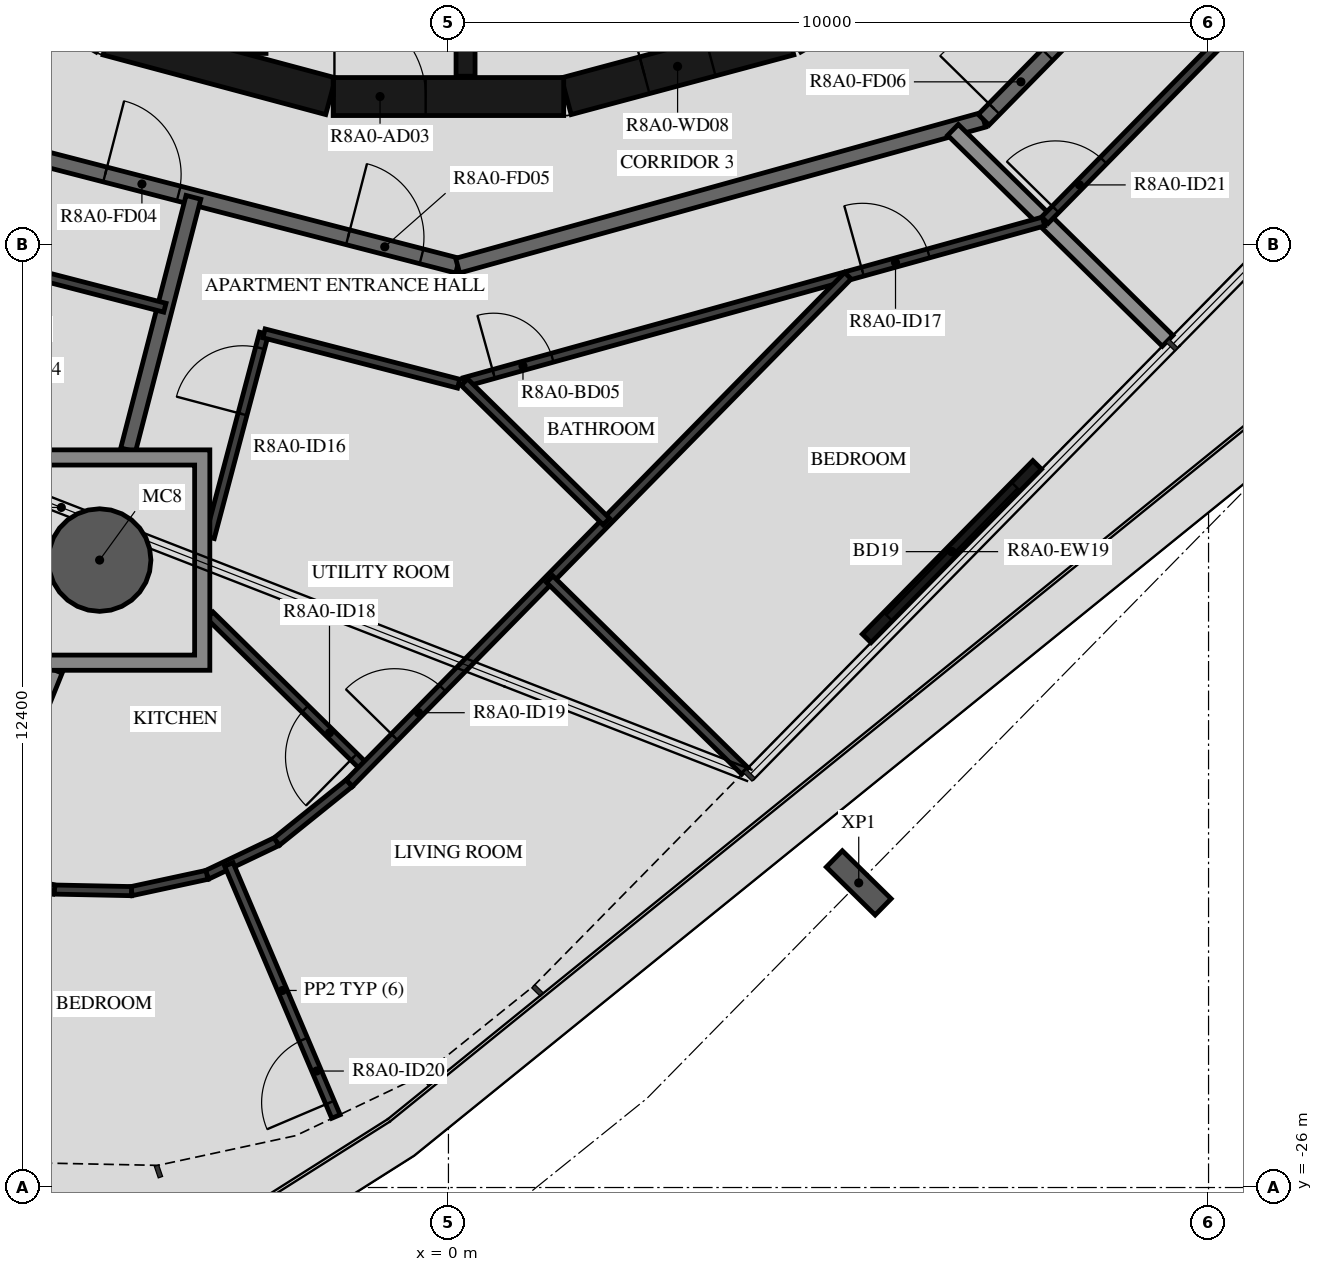
"""IFC4 building model, lengths in metres.
Left out: names, types, materials, properties, quantities, classifications, styles, units other than length and angle.
Written with IfcOpenShell. Run it as: python <this file> out.ifc"""

import sys

from ifc_helpers import new_model, si_unit, direction, frame, frame_2d, origin, origin_2d, place, context, subcontext, project, spatial, polyline, rectangle, hollow_circle, i_section, outline, extrude, element, fill, save


model = new_model("IFC4")
c1 = context("Model", 3, precision=1e-05, world=origin(), true_north=direction((0.0, 1.0)))
c2 = subcontext(c1, "Body", "Model", "MODEL_VIEW")
j1 = project(units=[si_unit("LENGTHUNIT", "METRE"), si_unit("PLANEANGLEUNIT", "RADIAN")], contexts=[c1])
p1 = place(None, origin())
s1 = spatial("IfcSite", under=j1, at=p1, CompositionType="ELEMENT")
p2 = place(p1, origin())
s2 = spatial("IfcBuilding", under=s1, at=p2, CompositionType="ELEMENT")
p3 = place(p2, frame((0.0, 0.0, 298.2)))
s3 = spatial("IfcBuildingStorey", under=s2, at=p3, CompositionType="ELEMENT", Elevation=298.2)
p4 = place(p3, frame((-4.589, -17.745, -0.45), z_axis=(0.0, 0.0, 1.0), x_axis=(1.0, 0.0, 0.0)))
e1 = element("IfcColumn", 1, at=p4, inside=s3, PredefinedType="COLUMN", context=c2, shape_type="SweptSolid", body=[
    extrude(hollow_circle(Radius=0.675, WallThickness=0.03, at=origin_2d()), origin(), (0.0, 0.0, 1.0), 3.57),
])
p5 = place(p3, frame((5.398, -21.992, -0.45), z_axis=(0.0, 0.0, 1.0), x_axis=(-0.70090935439, -0.713250360623, 0.0)))
e2 = element("IfcColumn", 2, at=p5, inside=s3, PredefinedType="COLUMN", context=c2, shape_type="SweptSolid", body=[
    extrude(i_section(OverallWidth=0.3, OverallDepth=0.9, WebThickness=0.019, FlangeThickness=0.035, FilletRadius=0.03, at=origin_2d()), origin(), (0.0, 0.0, 1.0), 3.57),
])
p6 = place(p3, frame((5.502, -18.776, 0.0), z_axis=(0.0, 0.0, 1.0), x_axis=(0.700900076932, 0.713259477439, 0.0)))
e3 = element("IfcWall", 3, at=p6, inside=s3, PredefinedType="STANDARD", context=c2, shape_type="SweptSolid", body=[
    extrude(rectangle(XDim=3.2, YDim=0.16, at=frame_2d((1.6, 0.0))), origin(), (0.0, 0.0, 1.0), 3.12),
])
p7 = place(p6, frame((0.4, 0.0, 0.0)))
e4 = element("IfcOpeningElement", 4, at=p7, cuts=e3, PredefinedType="OPENING", context=c2, shape_type="SweptSolid", body=[
    extrude(rectangle(XDim=2.4, YDim=2.4, at=frame_2d((1.2, 1.2))), frame((0.0, 0.09, 0.0), z_axis=(0.0, -1.0, 0.0), x_axis=(1.0, 0.0, 0.0)), (0.0, 0.0, 1.0), 0.18),
])
p8 = place(p3, frame((1.55, -11.643, 0.0), z_axis=(0.0, 0.0, 1.0), x_axis=(0.965948410781, 0.258734743916, 0.0)))
e5 = element("IfcWall", 5, at=p8, inside=s3, PredefinedType="SHEAR", context=c2, shape_type="SweptSolid", body=[
    extrude(rectangle(XDim=3.033, YDim=0.5, at=frame_2d((1.516, 0.0))), origin(), (0.0, 0.0, 1.0), 3.12),
])
p9 = place(p8, frame((1.066, 0.0, 0.0)))
e6 = element("IfcOpeningElement", 6, at=p9, cuts=e5, PredefinedType="OPENING", context=c2, shape_type="SweptSolid", body=[
    extrude(rectangle(XDim=0.9, YDim=2.1, at=frame_2d((0.45, 1.05))), frame((0.0, 0.26, 0.0), z_axis=(0.0, -1.0, 0.0), x_axis=(1.0, 0.0, 0.0)), (0.0, 0.0, 1.0), 0.52),
])
p10 = place(p3, frame((-4.479, -10.858, 0.0), z_axis=(0.0, 0.0, 1.0), x_axis=(0.965948410781, -0.258734743916, 0.0)))
e7 = element("IfcWall", 7, at=p10, inside=s3, PredefinedType="SHEAR", context=c2, shape_type="SweptSolid", body=[
    extrude(rectangle(XDim=3.033, YDim=0.5, at=frame_2d((1.516, 0.0))), origin(), (0.0, 0.0, 1.0), 3.12),
])
p11 = place(p3, frame((-1.516, -11.647, 0.0), z_axis=(0.0, 0.0, 1.0), x_axis=(1.0, 0.0, 0.0)))
e8 = element("IfcWall", 8, at=p11, inside=s3, PredefinedType="SHEAR", context=c2, shape_type="SweptSolid", body=[
    extrude(rectangle(XDim=3.033, YDim=0.5, at=frame_2d((1.516, 0.0))), origin(), (0.0, 0.0, 1.0), 3.12),
])
p12 = place(p11, frame((0.016, 0.0, 0.0)))
e9 = element("IfcOpeningElement", 9, at=p12, cuts=e8, PredefinedType="OPENING", context=c2, shape_type="SweptSolid", body=[
    extrude(rectangle(XDim=1.2, YDim=2.1, at=frame_2d((0.6, 1.05))), frame((0.0, 0.26, 0.0), z_axis=(0.0, -1.0, 0.0), x_axis=(1.0, 0.0, 0.0)), (0.0, 0.0, 1.0), 0.52),
])
p13 = place(p3, frame((-2.525, -8.97, 0.0), z_axis=(0.0, 0.0, 1.0), x_axis=(0.0, -1.0, 0.0)))
e10 = element("IfcWall", 10, at=p13, inside=s3, PredefinedType="SHEAR", context=c2, shape_type="SweptSolid", body=[
    extrude(rectangle(XDim=2.11, YDim=0.25, at=frame_2d((1.055, 0.0))), origin(), (0.0, 0.0, 1.0), 3.12),
])
p14 = place(p3, frame((0.225, -8.97, 0.0), z_axis=(0.0, 0.0, 1.0), x_axis=(0.0, -1.0, 0.0)))
e11 = element("IfcWall", 11, at=p14, inside=s3, PredefinedType="SHEAR", context=c2, shape_type="SweptSolid", body=[
    extrude(rectangle(XDim=2.41, YDim=0.25, at=frame_2d((1.205, 0.0))), origin(), (0.0, 0.0, 1.0), 3.12),
])
p15 = place(p3, frame((-6.831, -12.074, 0.0), z_axis=(0.0, 0.0, 1.0), x_axis=(0.968144780225, -0.250391063186, 0.0)))
e12 = element("IfcWall", 12, at=p15, inside=s3, PredefinedType="STANDARD", context=c2, shape_type="SweptSolid", body=[
    extrude(rectangle(XDim=7.181, YDim=0.2, at=frame_2d((3.591, 0.0))), origin(), (0.0, 0.0, 1.0), 3.12),
])
p16 = place(p15, frame((2.39, 0.0, 0.0)))
e13 = element("IfcOpeningElement", 13, at=p16, cuts=e12, PredefinedType="OPENING", context=c2, shape_type="SweptSolid", body=[
    extrude(rectangle(XDim=1.0, YDim=2.1, at=frame_2d((0.5, 1.05))), frame((0.0, 0.11, 0.0), z_axis=(0.0, -1.0, 0.0), x_axis=(1.0, 0.0, 0.0)), (0.0, 0.0, 1.0), 0.22),
])
p17 = place(p15, frame((5.69, 0.0, 0.0)))
e14 = element("IfcOpeningElement", 14, at=p17, cuts=e12, PredefinedType="OPENING", context=c2, shape_type="SweptSolid", body=[
    extrude(rectangle(XDim=1.0, YDim=2.1, at=frame_2d((0.5, 1.05))), frame((0.0, 0.11, 0.0), z_axis=(0.0, -1.0, 0.0), x_axis=(1.0, 0.0, 0.0)), (0.0, 0.0, 1.0), 0.22),
])
p18 = place(p3, frame((0.121, -13.872, 0.0), z_axis=(0.0, 0.0, 1.0), x_axis=(0.963625960674, 0.267254575108, 0.0)))
e15 = element("IfcWall", 15, at=p18, inside=s3, PredefinedType="STANDARD", context=c2, shape_type="SweptSolid", body=[
    extrude(rectangle(XDim=7.181, YDim=0.2, at=frame_2d((3.591, 0.0))), origin(), (0.0, 0.0, 1.0), 3.12),
])
p19 = place(p3, frame((7.041, -11.953, 0.0), z_axis=(0.0, 0.0, 1.0), x_axis=(0.70090916255, 0.713250549143, 0.0)))
e16 = element("IfcWall", 16, at=p19, inside=s3, PredefinedType="STANDARD", context=c2, shape_type="SweptSolid", body=[
    extrude(rectangle(XDim=7.181, YDim=0.2, at=frame_2d((3.59, 0.0))), origin(), (0.0, 0.0, 1.0), 3.12),
])
p20 = place(p19, frame((0.2, 0.0, 0.0)))
e17 = element("IfcOpeningElement", 17, at=p20, cuts=e16, PredefinedType="OPENING", context=c2, shape_type="SweptSolid", body=[
    extrude(rectangle(XDim=1.0, YDim=2.1, at=frame_2d((0.5, 1.05))), frame((0.0, 0.11, 0.0), z_axis=(0.0, -1.0, 0.0), x_axis=(1.0, 0.0, 0.0)), (0.0, 0.0, 1.0), 0.22),
])
p21 = place(p3, frame((-4.214, -16.295, 0.0), z_axis=(0.0, 0.0, 1.0), x_axis=(0.250428810918, 0.968135016752, 0.0)))
e18 = element("IfcWall", 18, at=p21, inside=s3, PredefinedType="STANDARD", context=c2, shape_type="SweptSolid", body=[
    extrude(rectangle(XDim=3.432, YDim=0.2, at=frame_2d((1.716, 0.0))), origin(), (0.0, 0.0, 1.0), 3.12),
])
p22 = place(p3, frame((-7.582, -25.151, 0.0), z_axis=(0.0, 0.0, 1.0), x_axis=(0.374645287615, 0.927168220156, 0.0)))
e19 = element("IfcWall", 19, at=p22, inside=s3, PredefinedType="STANDARD", context=c2, shape_type="SweptSolid", body=[
    extrude(rectangle(XDim=6.423, YDim=0.2, at=frame_2d((3.212, 0.0))), origin(), (0.0, 0.0, 1.0), 2.73),
])
p23 = place(p3, frame((9.462, -14.861, 0.0), z_axis=(0.0, 0.0, 1.0), x_axis=(-0.713276937124, 0.700882308927, 0.0)))
e20 = element("IfcWall", 20, at=p23, inside=s3, PredefinedType="STANDARD", context=c2, shape_type="SweptSolid", body=[
    extrude(rectangle(XDim=3.959, YDim=0.2, at=frame_2d((1.979, 0.0))), origin(), (0.0, 0.0, 1.0), 2.73),
])
p24 = place(p3, frame((-7.596, -13.426, 0.0), z_axis=(0.0, 0.0, 1.0), x_axis=(0.96815406745, -0.250355151095, 0.0)))
e21 = element("IfcWall", 21, at=p24, inside=s3, PredefinedType="PARTITIONING", context=c2, shape_type="SweptSolid", body=[
    extrude(rectangle(XDim=3.992, YDim=0.12, at=frame_2d((1.996, 0.0))), origin(), (0.0, 0.0, 1.0), 3.12),
])
p25 = place(p24, frame((0.2, 0.0, 0.0)))
e22 = element("IfcOpeningElement", 22, at=p25, cuts=e21, PredefinedType="OPENING", context=c2, shape_type="SweptSolid", body=[
    extrude(rectangle(XDim=0.9, YDim=2.1, at=frame_2d((0.45, 1.05))), frame((0.0, 0.07, 0.0), z_axis=(0.0, -1.0, 0.0), x_axis=(1.0, 0.0, 0.0)), (0.0, 0.0, 1.0), 0.14),
])
p26 = place(p3, frame((-3.139, -17.448, 0.0), z_axis=(0.0, 0.0, 1.0), x_axis=(0.256551998295, 0.966530430028, 0.0)))
e23 = element("IfcWall", 23, at=p26, inside=s3, PredefinedType="PARTITIONING", context=c2, shape_type="SweptSolid", body=[
    extrude(rectangle(XDim=2.778, YDim=0.12, at=frame_2d((1.389, 0.0))), origin(), (0.0, 0.0, 1.0), 3.12),
])
p27 = place(p26, frame((1.678, 0.0, 0.0)))
e24 = element("IfcOpeningElement", 24, at=p27, cuts=e23, PredefinedType="OPENING", context=c2, shape_type="SweptSolid", body=[
    extrude(rectangle(XDim=0.9, YDim=2.1, at=frame_2d((0.45, 1.05))), frame((0.0, 0.07, 0.0), z_axis=(0.0, -1.0, 0.0), x_axis=(1.0, 0.0, 0.0)), (0.0, 0.0, 1.0), 0.14),
])
p28 = place(p3, frame((-2.427, -14.763, 0.0), z_axis=(0.0, 0.0, 1.0), x_axis=(0.968151154118, -0.250366417036, 0.0)))
e25 = element("IfcWall", 25, at=p28, inside=s3, PredefinedType="PARTITIONING", context=c2, shape_type="SweptSolid", body=[
    extrude(rectangle(XDim=2.646, YDim=0.12, at=frame_2d((1.323, 0.0))), origin(), (0.0, 0.0, 1.0), 3.12),
])
p29 = place(p3, frame((0.21, -15.404, 0.0), z_axis=(0.0, 0.0, 1.0), x_axis=(0.963630625717, 0.267237754032, 0.0)))
e26 = element("IfcWall", 26, at=p29, inside=s3, PredefinedType="PARTITIONING", context=c2, shape_type="SweptSolid", body=[
    extrude(rectangle(XDim=7.907, YDim=0.12, at=frame_2d((3.954, 0.0))), origin(), (0.0, 0.0, 1.0), 3.12),
])
p30 = place(p29, frame((0.4, 0.0, 0.0)))
e27 = element("IfcOpeningElement", 27, at=p30, cuts=e26, PredefinedType="OPENING", context=c2, shape_type="SweptSolid", body=[
    extrude(rectangle(XDim=0.8, YDim=2.1, at=frame_2d((0.4, 1.05))), frame((0.0, 0.07, 0.0), z_axis=(0.0, -1.0, 0.0), x_axis=(1.0, 0.0, 0.0)), (0.0, 0.0, 1.0), 0.14),
])
p31 = place(p29, frame((5.436, 0.0, 0.0)))
e28 = element("IfcOpeningElement", 28, at=p31, cuts=e26, PredefinedType="OPENING", context=c2, shape_type="SweptSolid", body=[
    extrude(rectangle(XDim=0.9, YDim=2.1, at=frame_2d((0.45, 1.05))), frame((0.0, 0.07, 0.0), z_axis=(0.0, -1.0, 0.0), x_axis=(1.0, 0.0, 0.0)), (0.0, 0.0, 1.0), 0.14),
])
p32 = place(p3, frame((-2.26, -21.449, 0.0), z_axis=(0.0, 0.0, 1.0), x_axis=(-0.90254047062, -0.430605038166, 0.0)))
e29 = element("IfcWall", 29, at=p32, inside=s3, PredefinedType="PARTITIONING", context=c2, shape_type="SweptSolid", body=[
    extrude(rectangle(XDim=1.016, YDim=0.12, at=frame_2d((0.508, 0.0))), origin(), (0.0, 0.0, 1.0), 3.12),
])
for number, where, z_axis, x_axis in (
    (30, (-3.177, -21.887, 0.0), (0.0, 0.0, 1.0), (-0.978, -0.211, 0.0)),
    (31, (-4.17, -22.101, 0.0), (0.0, 0.0, 1.0), (-1.0, 0.02, 0.0)),
):
    element("IfcWall", number, at=place(p3, frame(where, z_axis=z_axis, x_axis=x_axis)), inside=s3, PredefinedType="PARTITIONING", context=c2, shape_type="SweptSolid", body=[
        extrude(rectangle(XDim=1.016, YDim=0.12, at=frame_2d((0.508, 0.0))), origin(), (0.0, 0.0, 1.0), 3.12),
    ])
p33 = place(p3, frame((-5.186, -22.08, 0.0), z_axis=(0.0, 0.0, 1.0), x_axis=(-0.968145907309, 0.250386705241, 0.0)))
e32 = element("IfcWall", 32, at=p33, inside=s3, PredefinedType="PARTITIONING", context=c2, shape_type="SweptSolid", body=[
    extrude(rectangle(XDim=1.016, YDim=0.12, at=frame_2d((0.508, 0.0))), origin(), (0.0, 0.0, 1.0), 3.12),
])
p34 = place(p3, frame((-1.48, -25.066, 0.0), z_axis=(0.0, 0.0, 1.0), x_axis=(-0.3909326022, 0.920419306912, 0.0)))
e33 = element("IfcWall", 33, at=p34, inside=s3, PredefinedType="PARTITIONING", context=c2, shape_type="SweptSolid", body=[
    extrude(rectangle(XDim=3.604, YDim=0.12, at=frame_2d((1.802, 0.0))), origin(), (0.0, 0.0, 1.0), 2.73),
])
p35 = place(p34, frame((0.2, 0.0, 0.0)))
e34 = element("IfcOpeningElement", 34, at=p35, cuts=e33, PredefinedType="OPENING", context=c2, shape_type="SweptSolid", body=[
    extrude(rectangle(XDim=0.9, YDim=2.1, at=frame_2d((0.45, 1.05))), frame((0.0, 0.07, 0.0), z_axis=(0.0, -1.0, 0.0), x_axis=(1.0, 0.0, 0.0)), (0.0, 0.0, 1.0), 0.14),
])
p36 = place(p3, frame((-1.101, -20.474, 0.0), z_axis=(0.0, 0.0, 1.0), x_axis=(-0.713316946232, 0.700841589961, 0.0)))
e35 = element("IfcWall", 35, at=p36, inside=s3, PredefinedType="PARTITIONING", context=c2, shape_type="SweptSolid", body=[
    extrude(rectangle(XDim=2.857, YDim=0.12, at=frame_2d((1.429, 0.0))), origin(), (0.0, 0.0, 1.0), 3.12),
])
p37 = place(p36, frame((0.2, 0.0, 0.0)))
e36 = element("IfcOpeningElement", 36, at=p37, cuts=e35, PredefinedType="OPENING", context=c2, shape_type="SweptSolid", body=[
    extrude(rectangle(XDim=0.9, YDim=2.1, at=frame_2d((0.45, 1.05))), frame((0.0, 0.07, 0.0), z_axis=(0.0, -1.0, 0.0), x_axis=(1.0, 0.0, 0.0)), (0.0, 0.0, 1.0), 0.14),
])
p38 = place(p3, frame((-2.26, -21.449, 0.0), z_axis=(0.0, 0.0, 1.0), x_axis=(0.779021167429, 0.626997624156, 0.0)))
e37 = element("IfcWall", 37, at=p38, inside=s3, PredefinedType="PARTITIONING", context=c2, shape_type="SweptSolid", body=[
    extrude(rectangle(XDim=1.227, YDim=0.12, at=frame_2d((0.614, 0.0))), origin(), (0.0, 0.0, 1.0), 3.12),
])
p39 = place(p3, frame((-1.304, -20.68, 0.0), z_axis=(0.0, 0.0, 1.0), x_axis=(0.700896976526, 0.713262524108, 0.0)))
e38 = element("IfcWall", 38, at=p39, inside=s3, PredefinedType="PARTITIONING", context=c2, shape_type="SweptSolid", body=[
    extrude(rectangle(XDim=9.358, YDim=0.12, at=frame_2d((4.679, 0.0))), origin(), (0.0, 0.0, 1.0), 3.12),
])
p40 = place(p39, frame((0.849, 0.0, 0.0)))
e39 = element("IfcOpeningElement", 39, at=p40, cuts=e38, PredefinedType="OPENING", context=c2, shape_type="SweptSolid", body=[
    extrude(rectangle(XDim=0.9, YDim=2.1, at=frame_2d((0.45, 1.05))), frame((0.0, 0.07, 0.0), z_axis=(0.0, -1.0, 0.0), x_axis=(1.0, 0.0, 0.0)), (0.0, 0.0, 1.0), 0.14),
])
p41 = place(p3, frame((2.077, -17.239, 0.0), z_axis=(0.0, 0.0, 1.0), x_axis=(-0.713235001716, 0.700924983381, 0.0)))
e40 = element("IfcWall", 40, at=p41, inside=s3, PredefinedType="PARTITIONING", context=c2, shape_type="SweptSolid", body=[
    extrude(rectangle(XDim=2.618, YDim=0.12, at=frame_2d((1.309, 0.0))), origin(), (0.0, 0.0, 1.0), 3.12),
])
p42 = place(p3, frame((3.9, -20.521, 0.0), z_axis=(0.0, 0.0, 1.0), x_axis=(-0.713217465002, 0.700942827637, 0.0)))
e41 = element("IfcWall", 41, at=p42, inside=s3, PredefinedType="PARTITIONING", context=c2, shape_type="SweptSolid", body=[
    extrude(rectangle(XDim=3.6, YDim=0.12, at=frame_2d((1.8, 0.0))), origin(), (0.0, 0.0, 1.0), 2.73),
])
p43 = place(p3, frame((7.846, -13.273, 0.0), z_axis=(0.0, 0.0, 1.0), x_axis=(0.700911018066, 0.713248725728, 0.0)))
e42 = element("IfcWall", 42, at=p43, inside=s3, PredefinedType="PARTITIONING", context=c2, shape_type="SweptSolid", body=[
    extrude(rectangle(XDim=7.935, YDim=0.12, at=frame_2d((3.968, 0.0))), origin(), (0.0, 0.0, 1.0), 3.12),
])
p44 = place(p43, frame((0.2, 0.0, 0.0)))
e43 = element("IfcOpeningElement", 43, at=p44, cuts=e42, PredefinedType="OPENING", context=c2, shape_type="SweptSolid", body=[
    extrude(rectangle(XDim=0.9, YDim=2.1, at=frame_2d((0.45, 1.05))), frame((0.0, 0.07, 0.0), z_axis=(0.0, -1.0, 0.0), x_axis=(1.0, 0.0, 0.0)), (0.0, 0.0, 1.0), 0.14),
])
p45 = place(p3, origin())
e44 = element("IfcWall", 44, at=p45, inside=s3, PredefinedType="STANDARD", context=c2, shape_type="SweptSolid", body=[
    extrude(outline(polyline([(-3.139, -16.295), (-3.139, -19.195), (-6.039, -19.195), (-6.039, -16.295), (-3.139, -16.295)]), holes=[polyline([(-5.839, -18.995), (-3.339, -18.995), (-3.339, -16.495), (-5.839, -16.495), (-5.839, -18.995)])]), origin(), (0.0, 0.0, 1.0), 3.12),
])
p46 = place(p7, origin())
e45 = element("IfcDoor", 45, at=p46, inside=s3, OperationType="DOUBLE_DOOR_SLIDING", PredefinedType="DOOR", context=c2, shape_type="SweptSolid", body=[
    extrude(rectangle(XDim=2.4, YDim=2.4, at=frame_2d((1.2, 1.2))), frame((0.0, 0.025, 0.0), z_axis=(0.0, -1.0, 0.0), x_axis=(1.0, 0.0, 0.0)), (0.0, 0.0, 1.0), 0.05),
])
fill(e4, e45)
p47 = place(p12, origin())
e46 = element("IfcDoor", 46, at=p47, inside=s3, OperationType="SINGLE_SWING_RIGHT", PredefinedType="DOOR", context=c2, shape_type="SweptSolid", body=[
    extrude(rectangle(XDim=1.2, YDim=2.1, at=frame_2d((0.6, 1.05))), frame((0.0, 0.025, 0.0), z_axis=(0.0, -1.0, 0.0), x_axis=(1.0, 0.0, 0.0)), (0.0, 0.0, 1.0), 0.05),
])
fill(e9, e46)
p48 = place(p9, origin())
e47 = element("IfcDoor", 47, at=p48, inside=s3, OperationType="SINGLE_SWING_RIGHT", PredefinedType="DOOR", context=c2, shape_type="SweptSolid", body=[
    extrude(rectangle(XDim=0.9, YDim=2.1, at=frame_2d((0.45, 1.05))), frame((0.0, 0.025, 0.0), z_axis=(0.0, -1.0, 0.0), x_axis=(1.0, 0.0, 0.0)), (0.0, 0.0, 1.0), 0.05),
])
fill(e6, e47)
p49 = place(p16, origin())
e48 = element("IfcDoor", 48, at=p49, inside=s3, OperationType="SINGLE_SWING_RIGHT", PredefinedType="DOOR", context=c2, shape_type="SweptSolid", body=[
    extrude(rectangle(XDim=1.0, YDim=2.1, at=frame_2d((0.5, 1.05))), frame((0.0, 0.025, 0.0), z_axis=(0.0, -1.0, 0.0), x_axis=(1.0, 0.0, 0.0)), (0.0, 0.0, 1.0), 0.05),
])
fill(e13, e48)
p50 = place(p17, origin())
e49 = element("IfcDoor", 49, at=p50, inside=s3, OperationType="SINGLE_SWING_LEFT", PredefinedType="DOOR", context=c2, shape_type="SweptSolid", body=[
    extrude(rectangle(XDim=1.0, YDim=2.1, at=frame_2d((0.5, 1.05))), frame((0.0, 0.025, 0.0), z_axis=(0.0, -1.0, 0.0), x_axis=(1.0, 0.0, 0.0)), (0.0, 0.0, 1.0), 0.05),
])
fill(e14, e49)
p51 = place(p27, origin())
e50 = element("IfcDoor", 50, at=p51, inside=s3, OperationType="SINGLE_SWING_LEFT", PredefinedType="DOOR", context=c2, shape_type="SweptSolid", body=[
    extrude(rectangle(XDim=0.9, YDim=2.1, at=frame_2d((0.45, 1.05))), frame((0.0, 0.025, 0.0), z_axis=(0.0, -1.0, 0.0), x_axis=(1.0, 0.0, 0.0)), (0.0, 0.0, 1.0), 0.05),
])
fill(e24, e50)
p52 = place(p30, origin())
e51 = element("IfcDoor", 51, at=p52, inside=s3, OperationType="SINGLE_SWING_LEFT", PredefinedType="DOOR", context=c2, shape_type="SweptSolid", body=[
    extrude(rectangle(XDim=0.8, YDim=2.1, at=frame_2d((0.4, 1.05))), frame((0.0, 0.025, 0.0), z_axis=(0.0, -1.0, 0.0), x_axis=(1.0, 0.0, 0.0)), (0.0, 0.0, 1.0), 0.05),
])
fill(e27, e51)
p53 = place(p31, origin())
e52 = element("IfcDoor", 52, at=p53, inside=s3, OperationType="SINGLE_SWING_LEFT", PredefinedType="DOOR", context=c2, shape_type="SweptSolid", body=[
    extrude(rectangle(XDim=0.9, YDim=2.1, at=frame_2d((0.45, 1.05))), frame((0.0, 0.025, 0.0), z_axis=(0.0, -1.0, 0.0), x_axis=(1.0, 0.0, 0.0)), (0.0, 0.0, 1.0), 0.05),
])
fill(e28, e52)
p54 = place(p37, origin())
e53 = element("IfcDoor", 53, at=p54, inside=s3, OperationType="SINGLE_SWING_LEFT", PredefinedType="DOOR", context=c2, shape_type="SweptSolid", body=[
    extrude(rectangle(XDim=0.9, YDim=2.1, at=frame_2d((0.45, 1.05))), frame((0.0, 0.025, 0.0), z_axis=(0.0, -1.0, 0.0), x_axis=(1.0, 0.0, 0.0)), (0.0, 0.0, 1.0), 0.05),
])
fill(e36, e53)
p55 = place(p40, origin())
e54 = element("IfcDoor", 54, at=p55, inside=s3, OperationType="SINGLE_SWING_LEFT", PredefinedType="DOOR", context=c2, shape_type="SweptSolid", body=[
    extrude(rectangle(XDim=0.9, YDim=2.1, at=frame_2d((0.45, 1.05))), frame((0.0, 0.025, 0.0), z_axis=(0.0, -1.0, 0.0), x_axis=(1.0, 0.0, 0.0)), (0.0, 0.0, 1.0), 0.05),
])
fill(e39, e54)
p56 = place(p35, origin())
e55 = element("IfcDoor", 55, at=p56, inside=s3, OperationType="SINGLE_SWING_LEFT", PredefinedType="DOOR", context=c2, shape_type="SweptSolid", body=[
    extrude(rectangle(XDim=0.9, YDim=2.1, at=frame_2d((0.45, 1.05))), frame((0.0, 0.025, 0.0), z_axis=(0.0, -1.0, 0.0), x_axis=(1.0, 0.0, 0.0)), (0.0, 0.0, 1.0), 0.05),
])
fill(e34, e55)
p57 = place(p20, origin())
e56 = element("IfcDoor", 56, at=p57, inside=s3, OperationType="SINGLE_SWING_LEFT", PredefinedType="DOOR", context=c2, shape_type="SweptSolid", body=[
    extrude(rectangle(XDim=1.0, YDim=2.1, at=frame_2d((0.5, 1.05))), frame((0.0, 0.025, 0.0), z_axis=(0.0, -1.0, 0.0), x_axis=(1.0, 0.0, 0.0)), (0.0, 0.0, 1.0), 0.05),
])
fill(e17, e56)
p58 = place(p44, origin())
e57 = element("IfcDoor", 57, at=p58, inside=s3, OperationType="SINGLE_SWING_LEFT", PredefinedType="DOOR", context=c2, shape_type="SweptSolid", body=[
    extrude(rectangle(XDim=0.9, YDim=2.1, at=frame_2d((0.45, 1.05))), frame((0.0, 0.025, 0.0), z_axis=(0.0, -1.0, 0.0), x_axis=(1.0, 0.0, 0.0)), (0.0, 0.0, 1.0), 0.05),
])
fill(e43, e57)
save(model, sys.argv[1])
